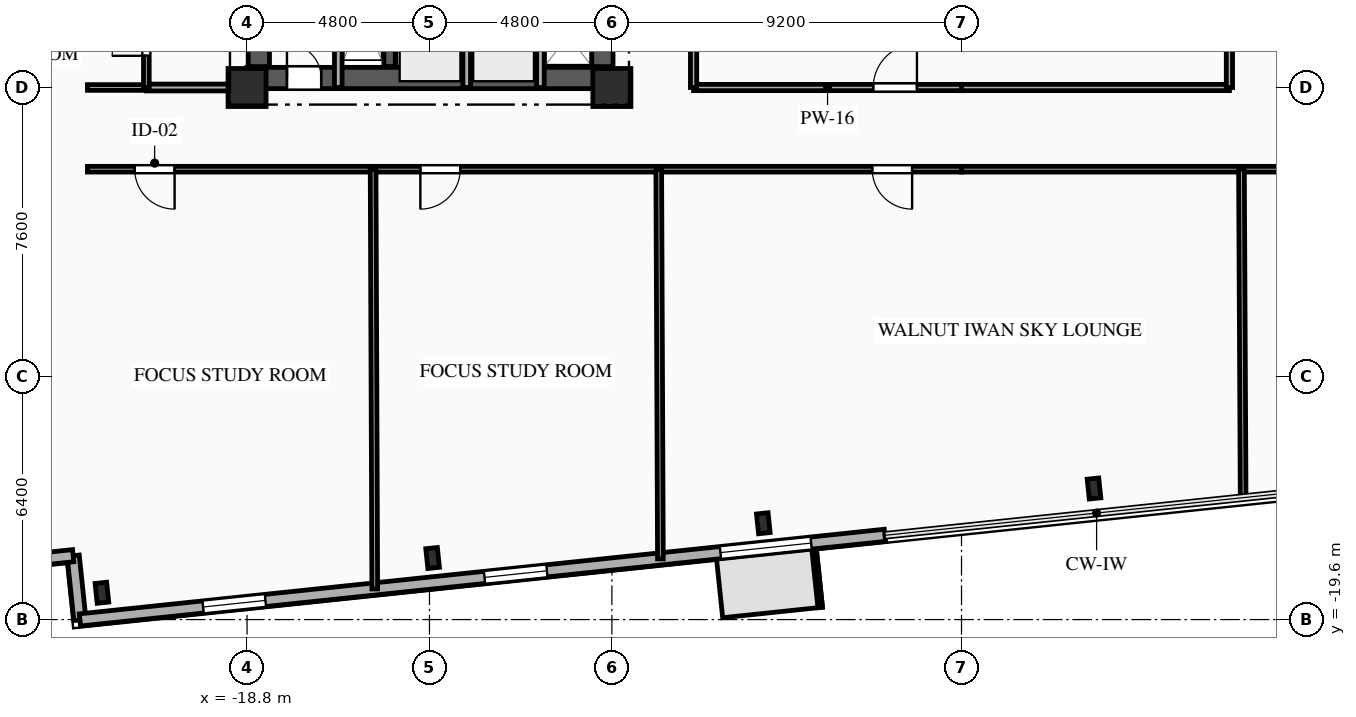
"""IFC4 building model, lengths in metres.
Left out: names, types, materials, properties, quantities, classifications, styles, units other than length and angle.
Written with IfcOpenShell. Run it as: python <this file> out.ifc"""

import sys

from ifc_helpers import new_model, si_unit, direction, frame, frame_2d, origin, origin_2d, place, context, subcontext, project, spatial, rectangle, i_section, extrude, element, fill, save


model = new_model("IFC4")
c1 = context("Model", 3, precision=1e-05, world=origin(), true_north=direction((0.0, 1.0)))
c2 = subcontext(c1, "Body", "Model", "MODEL_VIEW")
j1 = project(units=[si_unit("LENGTHUNIT", "METRE"), si_unit("PLANEANGLEUNIT", "RADIAN")], contexts=[c1])
p1 = place(None, origin())
s1 = spatial("IfcSite", under=j1, at=p1, CompositionType="ELEMENT")
p2 = place(p1, origin())
s2 = spatial("IfcBuilding", under=s1, at=p2, CompositionType="ELEMENT")
p3 = place(p2, frame((0.0, 0.0, 99.1)))
s3 = spatial("IfcBuildingStorey", under=s2, at=p3, CompositionType="ELEMENT", Elevation=99.1)
for number, where, z_axis, x_axis in (
    (1, (-18.8, -5.6, 0.0), (0.0, 0.0, 1.0), (1.0, 0.0, 0.0)),
    (2, (-9.2, -5.6, 0.0), (0.0, 0.0, 1.0), (1.0, 0.0, 0.0)),
):
    element("IfcColumn", number, at=place(p3, frame(where, z_axis=z_axis, x_axis=x_axis)), inside=s3, PredefinedType="COLUMN", context=c2, shape_type="SweptSolid", body=[
        extrude(rectangle(XDim=1.0, YDim=1.0, at=origin_2d()), origin(), (0.0, 0.0, 1.0), 3.35),
    ])
for number, where, z_axis, x_axis in (
    (3, (-22.619, -18.895, 0.0), (0.0, 0.0, 1.0), (0.995, 0.105, 0.0)),
    (4, (-13.917, -17.98, 0.0), (0.0, 0.0, 1.0), (0.995, 0.105, 0.0)),
    (5, (-5.215, -17.066, 0.0), (0.0, 0.0, 1.0), (0.995, 0.105, 0.0)),
    (6, (3.487, -16.151, 0.0), (0.0, 0.0, 1.0), (0.995, 0.105, 0.0)),
):
    element("IfcColumn", number, at=place(p3, frame(where, z_axis=z_axis, x_axis=x_axis)), inside=s3, PredefinedType="COLUMN", context=c2, shape_type="SweptSolid", body=[
        extrude(i_section(OverallWidth=0.306, OverallDepth=0.524, WebThickness=0.021, FlangeThickness=0.04, FilletRadius=0.027, at=origin_2d()), origin(), (0.0, 0.0, 1.0), 3.35),
    ])
for number, where, z_axis, x_axis in (
    (7, (-23.198, -19.609, 0.0), (0.0, 0.0, 1.0), (-0.105, 0.995, 0.0)),
    (8, (-23.376, -17.919, 0.0), (0.0, 0.0, 1.0), (-0.995, -0.105, 0.0)),
):
    element("IfcWall", number, at=place(p3, frame(where, z_axis=z_axis, x_axis=x_axis)), inside=s3, PredefinedType="SOLIDWALL", context=c2, shape_type="SweptSolid", body=[
        extrude(rectangle(XDim=1.7, YDim=0.32, at=frame_2d((0.85, 0.0))), origin(), (0.0, 0.0, 1.0), 3.045),
    ])
p4 = place(p3, frame((-2.015, -17.383, 0.0), z_axis=(0.0, 0.0, 1.0), x_axis=(-0.994521393935, -0.104533233979, 0.0)))
e9 = element("IfcWall", 9, at=p4, inside=s3, PredefinedType="SOLIDWALL", context=c2, shape_type="SweptSolid", body=[
    extrude(rectangle(XDim=21.3, YDim=0.32, at=frame_2d((10.65, 0.0))), origin(), (0.0, 0.0, 1.0), 3.045),
])
p5 = place(p4, frame((1.953, 0.0, 0.85)))
e10 = element("IfcOpeningElement", 10, at=p5, cuts=e9, PredefinedType="OPENING", context=c2, shape_type="SweptSolid", body=[
    extrude(rectangle(XDim=2.4, YDim=1.95, at=frame_2d((1.2, 0.975))), frame((0.0, 0.17, 0.0), z_axis=(0.0, -1.0, 0.0), x_axis=(1.0, 0.0, 0.0)), (0.0, 0.0, 1.0), 0.34),
])
p6 = place(p4, frame((8.944, 0.0, 0.85)))
e11 = element("IfcOpeningElement", 11, at=p6, cuts=e9, PredefinedType="OPENING", context=c2, shape_type="SweptSolid", body=[
    extrude(rectangle(XDim=1.65, YDim=1.85, at=frame_2d((0.825, 0.925))), frame((0.0, 0.17, 0.0), z_axis=(0.0, -1.0, 0.0), x_axis=(1.0, 0.0, 0.0)), (0.0, 0.0, 1.0), 0.34),
])
p7 = place(p4, frame((16.391, 0.0, 0.85)))
e12 = element("IfcOpeningElement", 12, at=p7, cuts=e9, PredefinedType="OPENING", context=c2, shape_type="SweptSolid", body=[
    extrude(rectangle(XDim=1.65, YDim=1.85, at=frame_2d((0.825, 0.925))), frame((0.0, 0.17, 0.0), z_axis=(0.0, -1.0, 0.0), x_axis=(1.0, 0.0, 0.0)), (0.0, 0.0, 1.0), 0.34),
])
p8 = place(p3, frame((-18.8, -5.35, 0.0), z_axis=(0.0, 0.0, 1.0), x_axis=(1.0, 0.0, 0.0)))
e13 = element("IfcWall", 13, at=p8, inside=s3, PredefinedType="SHEAR", context=c2, shape_type="SweptSolid", body=[
    extrude(rectangle(XDim=9.6, YDim=0.56, at=frame_2d((4.8, 0.0))), origin(), (0.0, 0.0, 1.0), 3.045),
])
p9 = place(p8, frame((1.05, 0.0, 0.0)))
e14 = element("IfcOpeningElement", 14, at=p9, cuts=e13, PredefinedType="OPENING", context=c2, shape_type="SweptSolid", body=[
    extrude(rectangle(XDim=0.9, YDim=2.1, at=frame_2d((0.45, 1.05))), frame((0.0, 0.29, 0.0), z_axis=(0.0, -1.0, 0.0), x_axis=(1.0, 0.0, 0.0)), (0.0, 0.0, 1.0), 0.58),
])
p10 = place(p3, frame((-18.49, -5.05, 0.0), z_axis=(0.0, 0.0, 1.0), x_axis=(0.0, 1.0, 0.0)))
e15 = element("IfcWall", 15, at=p10, inside=s3, PredefinedType="SHEAR", context=c2, shape_type="SweptSolid", body=[
    extrude(rectangle(XDim=10.1, YDim=0.56, at=frame_2d((5.05, 0.0))), origin(), (0.0, 0.0, 1.0), 3.045),
])
p11 = place(p3, frame((-9.45, -5.05, 0.0), z_axis=(0.0, 0.0, 1.0), x_axis=(0.0, 1.0, 0.0)))
e16 = element("IfcWall", 16, at=p11, inside=s3, PredefinedType="SHEAR", context=c2, shape_type="SweptSolid", body=[
    extrude(rectangle(XDim=10.1, YDim=0.56, at=frame_2d((5.05, 0.0))), origin(), (0.0, 0.0, 1.0), 3.045),
])
p12 = place(p11, frame((7.15, 0.0, 0.0)))
e17 = element("IfcOpeningElement", 17, at=p12, cuts=e16, PredefinedType="OPENING", context=c2, shape_type="SweptSolid", body=[
    extrude(rectangle(XDim=0.9, YDim=2.1, at=frame_2d((0.45, 1.05))), frame((0.0, 0.29, 0.0), z_axis=(0.0, -1.0, 0.0), x_axis=(1.0, 0.0, 0.0)), (0.0, 0.0, 1.0), 0.58),
])
p13 = place(p11, frame((2.4, 0.0, 0.0)))
e18 = element("IfcOpeningElement", 18, at=p13, cuts=e16, PredefinedType="OPENING", context=c2, shape_type="SweptSolid", body=[
    extrude(rectangle(XDim=1.2, YDim=2.15, at=frame_2d((0.6, 1.075))), frame((0.0, 0.29, 0.0), z_axis=(0.0, -1.0, 0.0), x_axis=(1.0, 0.0, 0.0)), (0.0, 0.0, 1.0), 0.58),
])
p14 = place(p3, frame((-15.05, -5.05, 0.0), z_axis=(0.0, 0.0, 1.0), x_axis=(0.0, 1.0, 0.0)))
e19 = element("IfcWall", 19, at=p14, inside=s3, PredefinedType="SHEAR", context=c2, shape_type="SweptSolid", body=[
    extrude(rectangle(XDim=10.1, YDim=0.3, at=frame_2d((5.05, 0.0))), origin(), (0.0, 0.0, 1.0), 3.045),
])
p15 = place(p3, frame((-16.4, -5.6, 0.0), z_axis=(0.0, 0.0, 1.0), x_axis=(0.0, 1.0, 0.0)))
e20 = element("IfcWall", 20, at=p15, inside=s3, PredefinedType="PARTITIONING", context=c2, shape_type="SweptSolid", body=[
    extrude(rectangle(XDim=3.49, YDim=0.2, at=frame_2d((1.745, 0.0))), origin(), (0.0, 0.0, 1.0), 3.045),
])
for number, where, z_axis, x_axis in (
    (21, (-13.02, -5.6, 0.0), (0.0, 0.0, 1.0), (0.0, 1.0, 0.0)),
    (22, (-11.08, -5.6, 0.0), (0.0, 0.0, 1.0), (0.0, 1.0, 0.0)),
):
    element("IfcWall", number, at=place(p3, frame(where, z_axis=z_axis, x_axis=x_axis)), inside=s3, PredefinedType="PARTITIONING", context=c2, shape_type="SweptSolid", body=[
        extrude(rectangle(XDim=2.25, YDim=0.2, at=frame_2d((1.125, 0.0))), origin(), (0.0, 0.0, 1.0), 3.045),
    ])
p16 = place(p3, frame((-21.45, -5.6, 0.0), z_axis=(0.0, 0.0, 1.0), x_axis=(1.0, 0.0, 0.0)))
e23 = element("IfcWall", 23, at=p16, inside=s3, PredefinedType="PARTITIONING", context=c2, shape_type="SweptSolid", body=[
    extrude(rectangle(XDim=2.65, YDim=0.18, at=frame_2d((1.325, 0.0))), origin(), (0.0, 0.0, 1.0), 3.045),
])
p17 = place(p3, frame((-23.0, -5.6, 0.0), z_axis=(0.0, 0.0, 1.0), x_axis=(1.0, 0.0, 0.0)))
e24 = element("IfcWall", 24, at=p17, inside=s3, PredefinedType="PLUMBINGWALL", context=c2, shape_type="SweptSolid", body=[
    extrude(rectangle(XDim=1.55, YDim=0.15, at=frame_2d((0.775, 0.0))), origin(), (0.0, 0.0, 1.0), 3.045),
])
p18 = place(p3, frame((-15.483, -7.75, 0.0), z_axis=(0.0, 0.0, 1.0), x_axis=(-1.0, 0.0, 0.0)))
e25 = element("IfcWall", 25, at=p18, inside=s3, PredefinedType="PARTITIONING", context=c2, shape_type="SweptSolid", body=[
    extrude(rectangle(XDim=7.517, YDim=0.15, at=frame_2d((3.758, 0.0))), origin(), (0.0, 0.0, 1.0), 3.045),
])
p19 = place(p18, frame((5.223, 0.0, 0.0)))
e26 = element("IfcOpeningElement", 26, at=p19, cuts=e25, PredefinedType="OPENING", context=c2, shape_type="SweptSolid", body=[
    extrude(rectangle(XDim=1.05, YDim=2.15, at=frame_2d((0.525, 1.075))), frame((0.0, 0.085, 0.0), z_axis=(0.0, -1.0, 0.0), x_axis=(1.0, 0.0, 0.0)), (0.0, 0.0, 1.0), 0.17),
])
p20 = place(p3, frame((-7.967, -7.75, 0.0), z_axis=(0.0, 0.0, 1.0), x_axis=(-1.0, 0.0, 0.0)))
e27 = element("IfcWall", 27, at=p20, inside=s3, PredefinedType="PARTITIONING", context=c2, shape_type="SweptSolid", body=[
    extrude(rectangle(XDim=7.516, YDim=0.15, at=frame_2d((3.758, 0.0))), origin(), (0.0, 0.0, 1.0), 3.045),
])
p21 = place(p20, frame((5.223, 0.0, 0.0)))
e28 = element("IfcOpeningElement", 28, at=p21, cuts=e27, PredefinedType="OPENING", context=c2, shape_type="SweptSolid", body=[
    extrude(rectangle(XDim=1.05, YDim=2.15, at=frame_2d((0.525, 1.075))), frame((0.0, 0.085, 0.0), z_axis=(0.0, -1.0, 0.0), x_axis=(1.0, 0.0, 0.0)), (0.0, 0.0, 1.0), 0.17),
])
p22 = place(p3, frame((0.0, -7.75, 0.0), z_axis=(0.0, 0.0, 1.0), x_axis=(-1.0, 0.0, 0.0)))
e29 = element("IfcWall", 29, at=p22, inside=s3, PredefinedType="PARTITIONING", context=c2, shape_type="SweptSolid", body=[
    extrude(rectangle(XDim=7.967, YDim=0.15, at=frame_2d((3.983, 0.0))), origin(), (0.0, 0.0, 1.0), 3.045),
])
p23 = place(p22, frame((1.3, 0.0, 0.0)))
e30 = element("IfcOpeningElement", 30, at=p23, cuts=e29, PredefinedType="OPENING", context=c2, shape_type="SweptSolid", body=[
    extrude(rectangle(XDim=1.05, YDim=2.15, at=frame_2d((0.525, 1.075))), frame((0.0, 0.085, 0.0), z_axis=(0.0, -1.0, 0.0), x_axis=(1.0, 0.0, 0.0)), (0.0, 0.0, 1.0), 0.17),
])
p24 = place(p3, frame((-7.05, -5.6, 0.0), z_axis=(0.0, 0.0, 1.0), x_axis=(1.0, 0.0, 0.0)))
e31 = element("IfcWall", 31, at=p24, inside=s3, PredefinedType="PARTITIONING", context=c2, shape_type="SweptSolid", body=[
    extrude(rectangle(XDim=7.05, YDim=0.165, at=frame_2d((3.525, 0.0))), origin(), (0.0, 0.0, 1.0), 2.53),
])
p25 = place(p24, frame((4.728, 0.0, 0.0)))
e32 = element("IfcOpeningElement", 32, at=p25, cuts=e31, PredefinedType="OPENING", context=c2, shape_type="SweptSolid", body=[
    extrude(rectangle(XDim=1.15, YDim=2.15, at=frame_2d((0.575, 1.075))), frame((0.0, 0.093, 0.0), z_axis=(0.0, -1.0, 0.0), x_axis=(1.0, 0.0, 0.0)), (0.0, 0.0, 1.0), 0.185),
])
p26 = place(p3, frame((7.367, -7.75, 0.0), z_axis=(0.0, 0.0, 1.0), x_axis=(-1.0, 0.0, 0.0)))
e33 = element("IfcWall", 33, at=p26, inside=s3, PredefinedType="PARTITIONING", context=c2, shape_type="SweptSolid", body=[
    extrude(rectangle(XDim=7.367, YDim=0.15, at=frame_2d((3.684, 0.0))), origin(), (0.0, 0.0, 1.0), 3.045),
])
p27 = place(p3, frame((23.0, -7.75, 0.0), z_axis=(0.0, 0.0, 1.0), x_axis=(-1.0, 0.0, 0.0)))
e34 = element("IfcWall", 34, at=p27, inside=s3, PredefinedType="PARTITIONING", context=c2, shape_type="SweptSolid", body=[
    extrude(rectangle(XDim=15.633, YDim=0.15, at=frame_2d((7.816, 0.0))), origin(), (0.0, 0.0, 1.0), 3.045),
])
p28 = place(p27, frame((8.969, 0.0, 0.0)))
e35 = element("IfcOpeningElement", 35, at=p28, cuts=e34, PredefinedType="OPENING", context=c2, shape_type="SweptSolid", body=[
    extrude(rectangle(XDim=1.05, YDim=2.15, at=frame_2d((0.525, 1.075))), frame((0.0, 0.085, 0.0), z_axis=(0.0, -1.0, 0.0), x_axis=(1.0, 0.0, 0.0)), (0.0, 0.0, 1.0), 0.17),
])
p29 = place(p3, frame((0.0, -5.6, 0.0), z_axis=(0.0, 0.0, 1.0), x_axis=(1.0, 0.0, 0.0)))
e36 = element("IfcWall", 36, at=p29, inside=s3, PredefinedType="PARTITIONING", context=c2, shape_type="SweptSolid", body=[
    extrude(rectangle(XDim=7.05, YDim=0.165, at=frame_2d((3.525, 0.0))), origin(), (0.0, 0.0, 1.0), 2.53),
])
for number, where, z_axis, x_axis in (
    (37, (-7.05, 1.45, 0.0), (0.0, 0.0, 1.0), (0.0, -1.0, 0.0)),
    (38, (7.05, -5.6, 0.0), (0.0, 0.0, 1.0), (0.0, 1.0, 0.0)),
):
    element("IfcWall", number, at=place(p3, frame(where, z_axis=z_axis, x_axis=x_axis)), inside=s3, PredefinedType="PARTITIONING", context=c2, shape_type="SweptSolid", body=[
        extrude(rectangle(XDim=7.05, YDim=0.165, at=frame_2d((3.525, 0.0))), origin(), (0.0, 0.0, 1.0), 3.045),
    ])
p30 = place(p3, frame((-21.45, -5.6, 0.0), z_axis=(0.0, 0.0, 1.0), x_axis=(0.0, 1.0, 0.0)))
e39 = element("IfcWall", 39, at=p30, inside=s3, PredefinedType="PLUMBINGWALL", context=c2, shape_type="SweptSolid", body=[
    extrude(rectangle(XDim=2.35, YDim=0.15, at=frame_2d((1.175, 0.0))), origin(), (0.0, 0.0, 1.0), 3.045),
])
p31 = place(p30, frame((0.834, 0.0, 0.0)))
e40 = element("IfcOpeningElement", 40, at=p31, cuts=e39, PredefinedType="OPENING", context=c2, shape_type="SweptSolid", body=[
    extrude(rectangle(XDim=0.9, YDim=2.1, at=frame_2d((0.45, 1.05))), frame((0.0, 0.085, 0.0), z_axis=(0.0, -1.0, 0.0), x_axis=(1.0, 0.0, 0.0)), (0.0, 0.0, 1.0), 0.17),
])
p32 = place(p3, frame((-15.483, -7.75, 0.0), z_axis=(0.0, 0.0, 1.0), x_axis=(0.003956994399, -0.999992171067, 0.0)))
e41 = element("IfcWall", 41, at=p32, inside=s3, PredefinedType="PARTITIONING", context=c2, shape_type="SweptSolid", body=[
    extrude(rectangle(XDim=11.044, YDim=0.15, at=frame_2d((5.522, 0.0))), origin(), (0.0, 0.0, 1.0), 3.045),
])
p33 = place(p3, frame((-7.967, -7.75, 0.0), z_axis=(0.0, 0.0, 1.0), x_axis=(0.004285674928, -0.999990816453, 0.0)))
e42 = element("IfcWall", 42, at=p33, inside=s3, PredefinedType="PARTITIONING", context=c2, shape_type="SweptSolid", body=[
    extrude(rectangle(XDim=10.254, YDim=0.15, at=frame_2d((5.127, 0.0))), origin(), (0.0, 0.0, 1.0), 3.045),
])
p34 = place(p3, frame((7.367, -7.75, 0.0), z_axis=(0.0, 0.0, 1.0), x_axis=(0.005084967311, -0.99998707147, 0.0)))
e43 = element("IfcWall", 43, at=p34, inside=s3, PredefinedType="PARTITIONING", context=c2, shape_type="SweptSolid", body=[
    extrude(rectangle(XDim=8.642, YDim=0.15, at=frame_2d((4.321, 0.0))), origin(), (0.0, 0.0, 1.0), 3.045),
])
p35 = place(p5, origin())
e44 = element("IfcWindow", 44, at=p35, inside=s3, PartitioningType="SINGLE_PANEL", PredefinedType="WINDOW", context=c2, shape_type="SweptSolid", body=[
    extrude(rectangle(XDim=2.4, YDim=1.95, at=frame_2d((1.2, 0.975))), frame((0.0, 0.03, 0.0), z_axis=(0.0, -1.0, 0.0), x_axis=(1.0, 0.0, 0.0)), (0.0, 0.0, 1.0), 0.06),
])
fill(e10, e44)
p36 = place(p6, origin())
e45 = element("IfcWindow", 45, at=p36, inside=s3, PartitioningType="SINGLE_PANEL", PredefinedType="WINDOW", context=c2, shape_type="SweptSolid", body=[
    extrude(rectangle(XDim=1.65, YDim=1.85, at=frame_2d((0.825, 0.925))), frame((0.0, 0.03, 0.0), z_axis=(0.0, -1.0, 0.0), x_axis=(1.0, 0.0, 0.0)), (0.0, 0.0, 1.0), 0.06),
])
fill(e11, e45)
p37 = place(p7, origin())
e46 = element("IfcWindow", 46, at=p37, inside=s3, PartitioningType="SINGLE_PANEL", PredefinedType="WINDOW", context=c2, shape_type="SweptSolid", body=[
    extrude(rectangle(XDim=1.65, YDim=1.85, at=frame_2d((0.825, 0.925))), frame((0.0, 0.03, 0.0), z_axis=(0.0, -1.0, 0.0), x_axis=(1.0, 0.0, 0.0)), (0.0, 0.0, 1.0), 0.06),
])
fill(e12, e46)
p38 = place(p9, origin())
e47 = element("IfcDoor", 47, at=p38, inside=s3, OperationType="SINGLE_SWING_LEFT", PredefinedType="DOOR", context=c2, shape_type="SweptSolid", body=[
    extrude(rectangle(XDim=0.9, YDim=2.1, at=frame_2d((0.45, 1.05))), frame((0.0, 0.025, 0.0), z_axis=(0.0, -1.0, 0.0), x_axis=(1.0, 0.0, 0.0)), (0.0, 0.0, 1.0), 0.05),
])
fill(e14, e47)
p39 = place(p19, origin())
e48 = element("IfcDoor", 48, at=p39, inside=s3, OperationType="SINGLE_SWING_LEFT", PredefinedType="DOOR", context=c2, shape_type="SweptSolid", body=[
    extrude(rectangle(XDim=1.05, YDim=2.15, at=frame_2d((0.525, 1.075))), frame((0.0, 0.025, 0.0), z_axis=(0.0, -1.0, 0.0), x_axis=(1.0, 0.0, 0.0)), (0.0, 0.0, 1.0), 0.05),
])
fill(e26, e48)
p40 = place(p21, origin())
e49 = element("IfcDoor", 49, at=p40, inside=s3, OperationType="SINGLE_SWING_RIGHT", PredefinedType="DOOR", context=c2, shape_type="SweptSolid", body=[
    extrude(rectangle(XDim=1.05, YDim=2.15, at=frame_2d((0.525, 1.075))), frame((0.0, 0.025, 0.0), z_axis=(0.0, -1.0, 0.0), x_axis=(1.0, 0.0, 0.0)), (0.0, 0.0, 1.0), 0.05),
])
fill(e28, e49)
p41 = place(p23, origin())
e50 = element("IfcDoor", 50, at=p41, inside=s3, OperationType="SINGLE_SWING_LEFT", PredefinedType="DOOR", context=c2, shape_type="SweptSolid", body=[
    extrude(rectangle(XDim=1.05, YDim=2.15, at=frame_2d((0.525, 1.075))), frame((0.0, 0.025, 0.0), z_axis=(0.0, -1.0, 0.0), x_axis=(1.0, 0.0, 0.0)), (0.0, 0.0, 1.0), 0.05),
])
fill(e30, e50)
p42 = place(p25, origin())
e51 = element("IfcDoor", 51, at=p42, inside=s3, OperationType="SINGLE_SWING_RIGHT", PredefinedType="DOOR", context=c2, shape_type="SweptSolid", body=[
    extrude(rectangle(XDim=1.15, YDim=2.15, at=frame_2d((0.575, 1.075))), frame((0.0, 0.025, 0.0), z_axis=(0.0, -1.0, 0.0), x_axis=(1.0, 0.0, 0.0)), (0.0, 0.0, 1.0), 0.05),
])
fill(e32, e51)
p43 = place(p31, origin())
e52 = element("IfcDoor", 52, at=p43, inside=s3, OperationType="SINGLE_SWING_LEFT", PredefinedType="DOOR", context=c2, shape_type="SweptSolid", body=[
    extrude(rectangle(XDim=0.9, YDim=2.1, at=frame_2d((0.45, 1.05))), frame((0.0, 0.025, 0.0), z_axis=(0.0, -1.0, 0.0), x_axis=(1.0, 0.0, 0.0)), (0.0, 0.0, 1.0), 0.05),
])
fill(e40, e52)
save(model, sys.argv[1])
